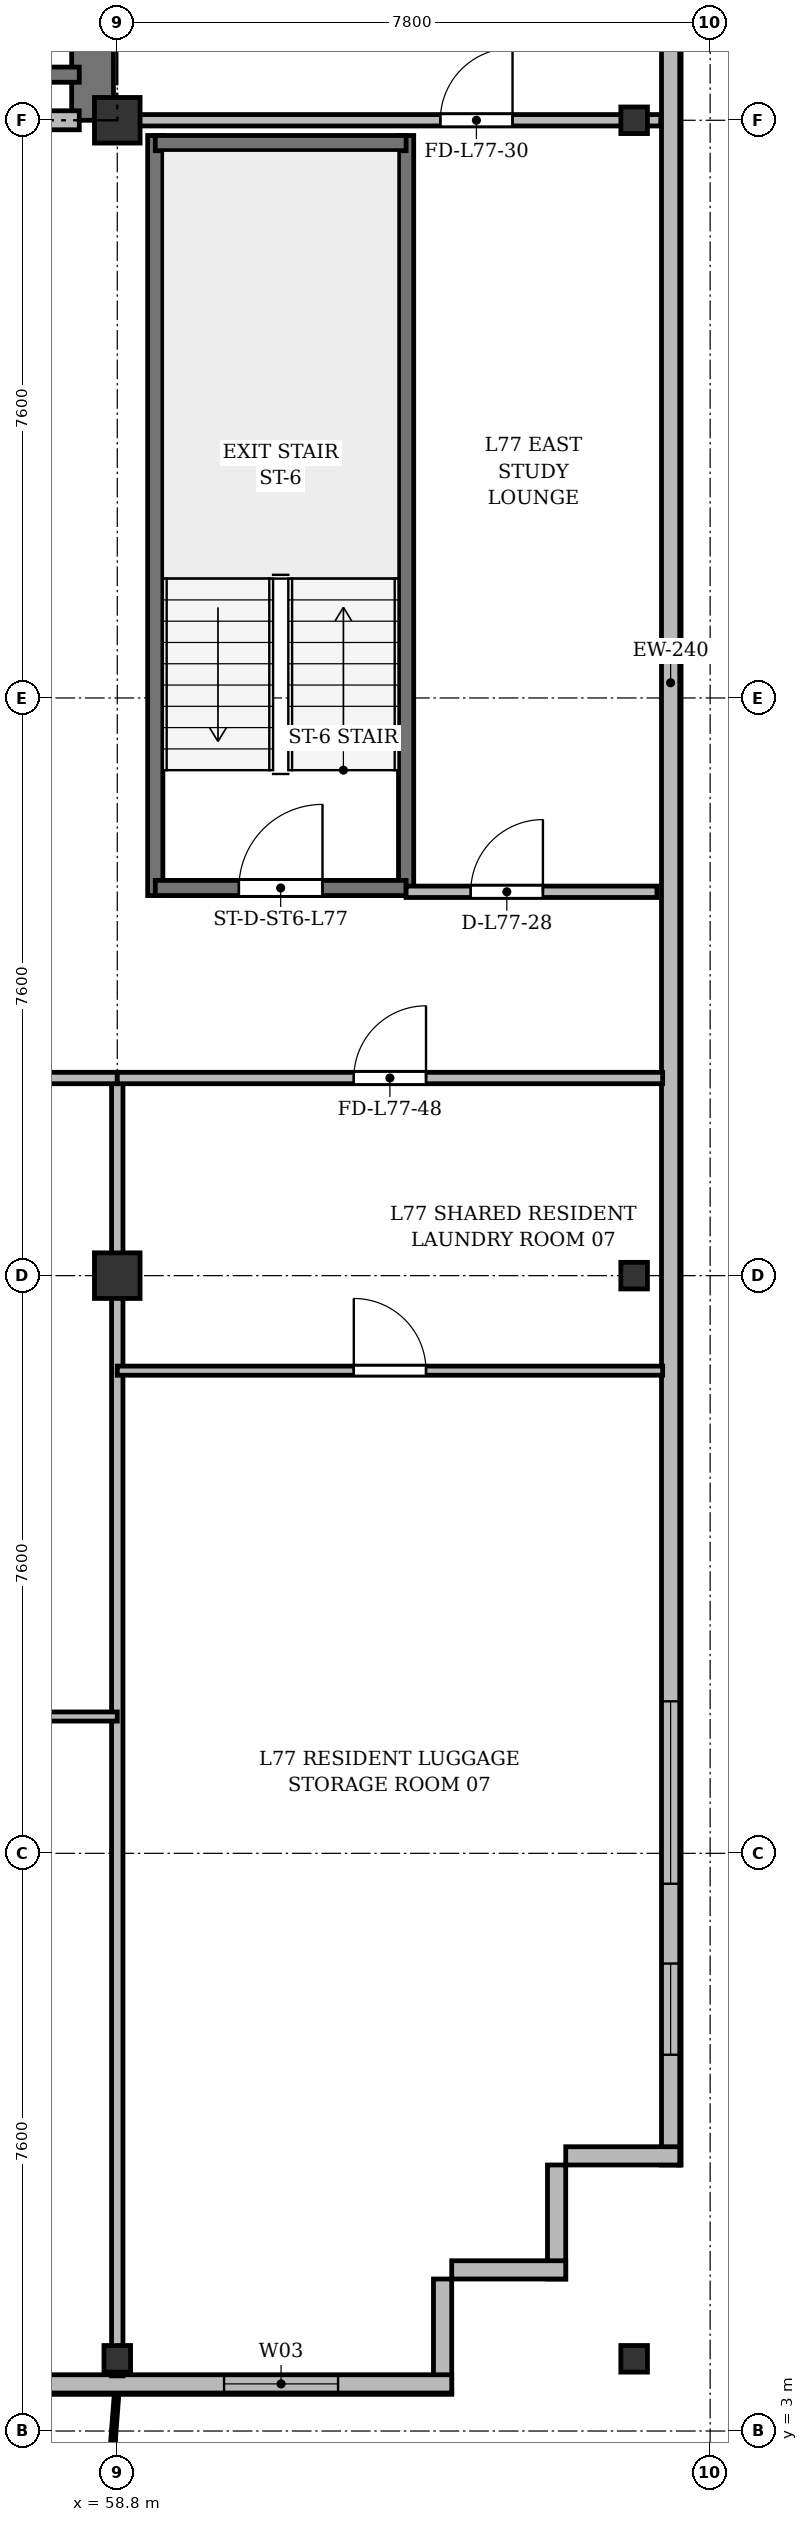
"""IFC4 building model, lengths in metres.
Left out: names, types, materials, properties, quantities, classifications, styles, units other than length and angle.
Written with IfcOpenShell. Run it as: python <this file> out.ifc"""

import sys

from ifc_helpers import new_model, si_unit, direction, frame, frame_2d, origin, origin_2d, place, context, subcontext, project, spatial, rectangle, i_section, extrude, source, transform, mapped, element, fill, save


model = new_model("IFC4")
c1 = context("Model", 3, precision=1e-05, world=origin(), true_north=direction((0.0, 1.0)))
c2 = subcontext(c1, "Body", "Model", "MODEL_VIEW")
j1 = project(units=[si_unit("LENGTHUNIT", "METRE"), si_unit("PLANEANGLEUNIT", "RADIAN")], contexts=[c1])
p1 = place(None, origin())
s1 = spatial("IfcSite", under=j1, at=p1, CompositionType="ELEMENT")
p2 = place(p1, origin())
s2 = spatial("IfcBuilding", under=s1, at=p2, CompositionType="ELEMENT")
p3 = place(p2, frame((0.0, 0.0, 295.5)))
s3 = spatial("IfcBuildingStorey", under=s2, at=p3, CompositionType="ELEMENT", Elevation=295.5)
m1 = source(origin(), c2, "Body", "SweptSolid", [
    extrude(i_section(OverallWidth=0.35, OverallDepth=0.35, WebThickness=0.018, FlangeThickness=0.028, at=origin_2d()), origin(), (0.0, 0.0, 1.0), 3.6),
])
p4 = place(p3, frame((58.8, 3.95, 0.0), z_axis=(0.0, 0.0, 1.0), x_axis=(1.0, 0.0, 0.0)))
e1 = element("IfcColumn", 1, at=p4, inside=s3, PredefinedType="COLUMN", context=c2, shape_type="MappedRepresentation", body=[
    mapped(m1, transform((0.0, 0.0, 0.0), x_axis=(1.0, 0.0, 0.0), y_axis=(0.0, 1.0, 0.0), z_axis=(0.0, 0.0, 1.0), scale=1.0)),
])
m2 = source(origin(), c2, "Body", "SweptSolid", [
    extrude(rectangle(XDim=0.6, YDim=0.6, at=origin_2d()), origin(), (0.0, 0.0, 1.0), 3.6),
])
for number, where, z_axis, x_axis in (
    (2, (58.8, 18.2, 0.0), (0.0, 0.0, 1.0), (1.0, 0.0, 0.0)),
    (3, (58.8, 33.4, 0.0), (0.0, 0.0, 1.0), (1.0, 0.0, 0.0)),
):
    element("IfcColumn", number, at=place(p3, frame(where, z_axis=z_axis, x_axis=x_axis)), inside=s3, PredefinedType="COLUMN", context=c2, shape_type="MappedRepresentation", body=[
        mapped(m2, transform((0.0, 0.0, 0.0), x_axis=(1.0, 0.0, 0.0), y_axis=(0.0, 1.0, 0.0), z_axis=(0.0, 0.0, 1.0), scale=1.0)),
    ])
for number, where, z_axis, x_axis in (
    (4, (65.6, 3.95, 0.0), (0.0, 0.0, 1.0), (1.0, 0.0, 0.0)),
    (5, (65.6, 18.2, 0.0), (0.0, 0.0, 1.0), (1.0, 0.0, 0.0)),
    (6, (65.6, 33.4, 0.0), (0.0, 0.0, 1.0), (1.0, 0.0, 0.0)),
):
    element("IfcColumn", number, at=place(p3, frame(where, z_axis=z_axis, x_axis=x_axis)), inside=s3, PredefinedType="COLUMN", context=c2, shape_type="MappedRepresentation", body=[
        mapped(m1, transform((0.0, 0.0, 0.0), x_axis=(1.0, 0.0, 0.0), y_axis=(0.0, 1.0, 0.0), z_axis=(0.0, 0.0, 1.0), scale=1.0)),
    ])
p5 = place(p3, frame((66.08, 45.5, 0.0), z_axis=(0.0, 0.0, 1.0), x_axis=(0.0, -1.0, 0.0)))
e7 = element("IfcWall", 7, at=p5, inside=s3, PredefinedType="SOLIDWALL", context=c2, shape_type="SweptSolid", body=[
    extrude(rectangle(XDim=39.0, YDim=0.24, at=frame_2d((19.5, 0.0))), origin(), (0.0, 0.0, 1.0), 3.26),
])
p6 = place(p5, frame((36.35, 0.0, 0.92)))
e8 = element("IfcOpeningElement", 8, at=p6, cuts=e7, PredefinedType="OPENING", context=c2, shape_type="SweptSolid", body=[
    extrude(rectangle(XDim=1.2, YDim=1.65, at=frame_2d((0.6, 0.825))), frame((0.0, 0.13, 0.0), z_axis=(0.0, -1.0, 0.0), x_axis=(1.0, 0.0, 0.0)), (0.0, 0.0, 1.0), 0.26),
])
p7 = place(p5, frame((32.9, 0.0, 0.92)))
e9 = element("IfcOpeningElement", 9, at=p7, cuts=e7, PredefinedType="OPENING", context=c2, shape_type="SweptSolid", body=[
    extrude(rectangle(XDim=2.4, YDim=2.1, at=frame_2d((1.2, 1.05))), frame((0.0, 0.13, 0.0), z_axis=(0.0, -1.0, 0.0), x_axis=(1.0, 0.0, 0.0)), (0.0, 0.0, 1.0), 0.26),
])
p8 = place(p5, frame((7.5, 0.0, 0.92)))
e10 = element("IfcOpeningElement", 10, at=p8, cuts=e7, PredefinedType="OPENING", context=c2, shape_type="SweptSolid", body=[
    extrude(rectangle(XDim=2.4, YDim=2.1, at=frame_2d((1.2, 1.05))), frame((0.0, 0.13, 0.0), z_axis=(0.0, -1.0, 0.0), x_axis=(1.0, 0.0, 0.0)), (0.0, 0.0, 1.0), 0.26),
])
p9 = place(p5, frame((4.5, 0.0, 0.92)))
e11 = element("IfcOpeningElement", 11, at=p9, cuts=e7, PredefinedType="OPENING", context=c2, shape_type="SweptSolid", body=[
    extrude(rectangle(XDim=1.2, YDim=1.65, at=frame_2d((0.6, 0.825))), frame((0.0, 0.13, 0.0), z_axis=(0.0, -1.0, 0.0), x_axis=(1.0, 0.0, 0.0)), (0.0, 0.0, 1.0), 0.26),
])
p10 = place(p5, frame((1.15, 0.0, 0.92)))
e12 = element("IfcOpeningElement", 12, at=p10, cuts=e7, PredefinedType="OPENING", context=c2, shape_type="SweptSolid", body=[
    extrude(rectangle(XDim=1.2, YDim=1.65, at=frame_2d((0.6, 0.825))), frame((0.0, 0.13, 0.0), z_axis=(0.0, -1.0, 0.0), x_axis=(1.0, 0.0, 0.0)), (0.0, 0.0, 1.0), 0.26),
])
p11 = place(p3, frame((66.2, 6.62, 0.0), z_axis=(0.0, 0.0, 1.0), x_axis=(-1.0, 0.0, 0.0)))
e13 = element("IfcWall", 13, at=p11, inside=s3, PredefinedType="SOLIDWALL", context=c2, shape_type="SweptSolid", body=[
    extrude(rectangle(XDim=1.5, YDim=0.24, at=frame_2d((0.75, 0.0))), origin(), (0.0, 0.0, 1.0), 2.76),
])
for number, where, z_axis, x_axis in (
    (14, (64.58, 6.5, 0.0), (0.0, 0.0, 1.0), (0.0, -1.0, 0.0)),
    (15, (64.7, 5.12, 0.0), (0.0, 0.0, 1.0), (-1.0, 0.0, 0.0)),
):
    element("IfcWall", number, at=place(p3, frame(where, z_axis=z_axis, x_axis=x_axis)), inside=s3, PredefinedType="SOLIDWALL", context=c2, shape_type="SweptSolid", body=[
        extrude(rectangle(XDim=1.5, YDim=0.24, at=frame_2d((0.75, 0.0))), origin(), (0.0, 0.0, 1.0), 3.26),
    ])
p12 = place(p3, frame((63.08, 5.0, 0.0), z_axis=(0.0, 0.0, 1.0), x_axis=(0.0, -1.0, 0.0)))
e16 = element("IfcWall", 16, at=p12, inside=s3, PredefinedType="SOLIDWALL", context=c2, shape_type="SweptSolid", body=[
    extrude(rectangle(XDim=1.5, YDim=0.24, at=frame_2d((0.75, 0.0))), origin(), (0.0, 0.0, 1.0), 2.81),
])
p13 = place(p3, frame((63.2, 3.62, 0.0), z_axis=(0.0, 0.0, 1.0), x_axis=(-1.0, 0.0, 0.0)))
e17 = element("IfcWall", 17, at=p13, inside=s3, PredefinedType="SOLIDWALL", context=c2, shape_type="SweptSolid", body=[
    extrude(rectangle(XDim=20.2, YDim=0.24, at=frame_2d((10.1, 0.0))), origin(), (0.0, 0.0, 1.0), 3.26),
])
p14 = place(p13, frame((1.495, 0.0, 0.9)))
e18 = element("IfcOpeningElement", 18, at=p14, cuts=e17, PredefinedType="OPENING", context=c2, shape_type="SweptSolid", body=[
    extrude(rectangle(XDim=1.5, YDim=1.75, at=frame_2d((0.75, 0.875))), frame((0.0, 0.13, 0.0), z_axis=(0.0, -1.0, 0.0), x_axis=(1.0, 0.0, 0.0)), (0.0, 0.0, 1.0), 0.26),
])
p15 = place(p13, frame((7.3, 0.0, 0.9)))
e19 = element("IfcOpeningElement", 19, at=p15, cuts=e17, PredefinedType="OPENING", context=c2, shape_type="SweptSolid", body=[
    extrude(rectangle(XDim=2.0, YDim=1.95, at=frame_2d((1.0, 0.975))), frame((0.0, 0.13, 0.0), z_axis=(0.0, -1.0, 0.0), x_axis=(1.0, 0.0, 0.0)), (0.0, 0.0, 1.0), 0.26),
])
p16 = place(p13, frame((13.864, 0.0, 0.0)))
e20 = element("IfcOpeningElement", 20, at=p16, cuts=e17, PredefinedType="OPENING", context=c2, shape_type="SweptSolid", body=[
    extrude(rectangle(XDim=1.2, YDim=2.2, at=frame_2d((0.6, 1.1))), frame((0.0, 0.13, 0.0), z_axis=(0.0, -1.0, 0.0), x_axis=(1.0, 0.0, 0.0)), (0.0, 0.0, 1.0), 0.26),
])
p17 = place(p13, frame((16.7, 0.0, 0.9)))
e21 = element("IfcOpeningElement", 21, at=p17, cuts=e17, PredefinedType="OPENING", context=c2, shape_type="SweptSolid", body=[
    extrude(rectangle(XDim=1.8, YDim=1.8, at=frame_2d((0.9, 0.9))), frame((0.0, 0.13, 0.0), z_axis=(0.0, -1.0, 0.0), x_axis=(1.0, 0.0, 0.0)), (0.0, 0.0, 1.0), 0.26),
])
p18 = place(p3, frame((58.475, 33.4, 0.0), z_axis=(0.0, 0.0, 1.0), x_axis=(0.0, 1.0, 0.0)))
e22 = element("IfcWall", 22, at=p18, inside=s3, PredefinedType="SHEAR", context=c2, shape_type="SweptSolid", body=[
    extrude(rectangle(XDim=11.55, YDim=0.55, at=frame_2d((5.775, 0.0))), origin(), (0.0, 0.0, 1.0), 3.26),
])
p19 = place(p3, frame((54.9, 34.0, 0.0), z_axis=(0.0, 0.0, 1.0), x_axis=(1.0, 0.0, 0.0)))
e23 = element("IfcWall", 23, at=p19, inside=s3, PredefinedType="SHEAR", context=c2, shape_type="SweptSolid", body=[
    extrude(rectangle(XDim=3.4, YDim=0.2, at=frame_2d((1.7, 0.0))), origin(), (0.0, 0.0, 1.0), 3.26),
])
for number, where, z_axis, x_axis in (
    (24, (59.3, 23.2, 0.0), (0.0, 0.0, 1.0), (0.0, 1.0, 0.0)),
    (25, (62.6, 23.2, 0.0), (0.0, 0.0, 1.0), (0.0, 1.0, 0.0)),
):
    element("IfcWall", number, at=place(p3, frame(where, z_axis=z_axis, x_axis=x_axis)), inside=s3, PredefinedType="SHEAR", context=c2, shape_type="SweptSolid", body=[
        extrude(rectangle(XDim=10.0, YDim=0.2, at=frame_2d((5.0, 0.0))), origin(), (0.0, 0.0, 1.0), 3.26),
    ])
p20 = place(p3, frame((59.3, 33.1, 0.0), z_axis=(0.0, 0.0, 1.0), x_axis=(1.0, 0.0, 0.0)))
e26 = element("IfcWall", 26, at=p20, inside=s3, PredefinedType="SHEAR", context=c2, shape_type="SweptSolid", body=[
    extrude(rectangle(XDim=3.3, YDim=0.2, at=frame_2d((1.65, 0.0))), origin(), (0.0, 0.0, 1.0), 3.26),
])
p21 = place(p3, frame((59.3, 23.3, 0.0), z_axis=(0.0, 0.0, 1.0), x_axis=(1.0, 0.0, 0.0)))
e27 = element("IfcWall", 27, at=p21, inside=s3, PredefinedType="SHEAR", context=c2, shape_type="SweptSolid", body=[
    extrude(rectangle(XDim=3.3, YDim=0.2, at=frame_2d((1.65, 0.0))), origin(), (0.0, 0.0, 1.0), 3.26),
])
p22 = place(p21, frame((1.1, 0.0, 0.0)))
e28 = element("IfcOpeningElement", 28, at=p22, cuts=e27, PredefinedType="OPENING", context=c2, shape_type="SweptSolid", body=[
    extrude(rectangle(XDim=1.1, YDim=2.15, at=frame_2d((0.55, 1.075))), frame((0.0, 0.11, 0.0), z_axis=(0.0, -1.0, 0.0), x_axis=(1.0, 0.0, 0.0)), (0.0, 0.0, 1.0), 0.22),
])
p23 = place(p3, frame((47.15, 33.4, 0.0), z_axis=(0.0, 0.0, 1.0), x_axis=(1.0, 0.0, 0.0)))
e29 = element("IfcWall", 29, at=p23, inside=s3, PredefinedType="PARTITIONING", context=c2, shape_type="SweptSolid", body=[
    extrude(rectangle(XDim=11.15, YDim=0.25, at=frame_2d((5.575, 0.0))), origin(), (0.0, 0.0, 1.0), 2.81),
])
p24 = place(p23, frame((0.7, 0.0, 0.0)))
e30 = element("IfcOpeningElement", 30, at=p24, cuts=e29, PredefinedType="OPENING", context=c2, shape_type="SweptSolid", body=[
    extrude(rectangle(XDim=0.95, YDim=2.15, at=frame_2d((0.475, 1.075))), frame((0.0, 0.135, 0.0), z_axis=(0.0, -1.0, 0.0), x_axis=(1.0, 0.0, 0.0)), (0.0, 0.0, 1.0), 0.27),
])
p25 = place(p23, frame((6.0, 0.0, 0.0)))
e31 = element("IfcOpeningElement", 31, at=p25, cuts=e29, PredefinedType="OPENING", context=c2, shape_type="SweptSolid", body=[
    extrude(rectangle(XDim=1.2, YDim=2.15, at=frame_2d((0.6, 1.075))), frame((0.0, 0.135, 0.0), z_axis=(0.0, -1.0, 0.0), x_axis=(1.0, 0.0, 0.0)), (0.0, 0.0, 1.0), 0.27),
])
p26 = place(p3, frame((62.6, 23.25, 0.0), z_axis=(0.0, 0.0, 1.0), x_axis=(1.0, 0.0, 0.0)))
e32 = element("IfcWall", 32, at=p26, inside=s3, PredefinedType="PARTITIONING", context=c2, shape_type="SweptSolid", body=[
    extrude(rectangle(XDim=3.3, YDim=0.15, at=frame_2d((1.65, 0.0))), origin(), (0.0, 0.0, 1.0), 2.76),
])
p27 = place(p26, frame((0.85, 0.0, 0.0)))
e33 = element("IfcOpeningElement", 33, at=p27, cuts=e32, PredefinedType="OPENING", context=c2, shape_type="SweptSolid", body=[
    extrude(rectangle(XDim=0.95, YDim=2.15, at=frame_2d((0.475, 1.075))), frame((0.0, 0.085, 0.0), z_axis=(0.0, -1.0, 0.0), x_axis=(1.0, 0.0, 0.0)), (0.0, 0.0, 1.0), 0.17),
])
p28 = place(p3, frame((58.8, 33.4, 0.0), z_axis=(0.0, 0.0, 1.0), x_axis=(1.0, 0.0, 0.0)))
e34 = element("IfcWall", 34, at=p28, inside=s3, PredefinedType="PARTITIONING", context=c2, shape_type="SweptSolid", body=[
    extrude(rectangle(XDim=7.15, YDim=0.15, at=frame_2d((3.575, 0.0))), origin(), (0.0, 0.0, 1.0), 2.81),
])
p29 = place(p28, frame((4.25, 0.0, 0.0)))
e35 = element("IfcOpeningElement", 35, at=p29, cuts=e34, PredefinedType="OPENING", context=c2, shape_type="SweptSolid", body=[
    extrude(rectangle(XDim=0.95, YDim=2.15, at=frame_2d((0.475, 1.075))), frame((0.0, 0.085, 0.0), z_axis=(0.0, -1.0, 0.0), x_axis=(1.0, 0.0, 0.0)), (0.0, 0.0, 1.0), 0.17),
])
p30 = place(p3, frame((58.8, 3.725, 0.0), z_axis=(0.0, 0.0, 1.0), x_axis=(0.0, 1.0, 0.0)))
e36 = element("IfcWall", 36, at=p30, inside=s3, PredefinedType="PARTITIONING", context=c2, shape_type="SweptSolid", body=[
    extrude(rectangle(XDim=17.075, YDim=0.15, at=frame_2d((8.538, 0.0))), origin(), (0.0, 0.0, 1.0), 2.76),
])
p31 = place(p3, frame((51.0, 20.8, 0.0), z_axis=(0.0, 0.0, 1.0), x_axis=(1.0, 0.0, 0.0)))
e37 = element("IfcWall", 37, at=p31, inside=s3, PredefinedType="PARTITIONING", context=c2, shape_type="SweptSolid", body=[
    extrude(rectangle(XDim=7.8, YDim=0.15, at=frame_2d((3.9, 0.0))), origin(), (0.0, 0.0, 1.0), 2.76),
])
p32 = place(p31, frame((3.333, 0.0, 0.0)))
e38 = element("IfcOpeningElement", 38, at=p32, cuts=e37, PredefinedType="OPENING", context=c2, shape_type="SweptSolid", body=[
    extrude(rectangle(XDim=0.95, YDim=2.15, at=frame_2d((0.475, 1.075))), frame((0.0, 0.085, 0.0), z_axis=(0.0, -1.0, 0.0), x_axis=(1.0, 0.0, 0.0)), (0.0, 0.0, 1.0), 0.17),
])
p33 = place(p3, frame((51.0, 12.4, 0.0), z_axis=(0.0, 0.0, 1.0), x_axis=(1.0, 0.0, 0.0)))
e39 = element("IfcWall", 39, at=p33, inside=s3, PredefinedType="PARTITIONING", context=c2, shape_type="SweptSolid", body=[
    extrude(rectangle(XDim=7.8, YDim=0.12, at=frame_2d((3.9, 0.0))), origin(), (0.0, 0.0, 1.0), 2.76),
])
p34 = place(p33, frame((3.333, 0.0, 0.0)))
e40 = element("IfcOpeningElement", 40, at=p34, cuts=e39, PredefinedType="OPENING", context=c2, shape_type="SweptSolid", body=[
    extrude(rectangle(XDim=0.95, YDim=2.15, at=frame_2d((0.475, 1.075))), frame((0.0, 0.07, 0.0), z_axis=(0.0, -1.0, 0.0), x_axis=(1.0, 0.0, 0.0)), (0.0, 0.0, 1.0), 0.14),
])
p35 = place(p3, frame((58.8, 20.8, 0.0), z_axis=(0.0, 0.0, 1.0), x_axis=(1.0, 0.0, 0.0)))
e41 = element("IfcWall", 41, at=p35, inside=s3, PredefinedType="PARTITIONING", context=c2, shape_type="SweptSolid", body=[
    extrude(rectangle(XDim=7.175, YDim=0.15, at=frame_2d((3.587, 0.0))), origin(), (0.0, 0.0, 1.0), 2.76),
])
p36 = place(p35, frame((3.112, 0.0, 0.0)))
e42 = element("IfcOpeningElement", 42, at=p36, cuts=e41, PredefinedType="OPENING", context=c2, shape_type="SweptSolid", body=[
    extrude(rectangle(XDim=0.95, YDim=2.15, at=frame_2d((0.475, 1.075))), frame((0.0, 0.085, 0.0), z_axis=(0.0, -1.0, 0.0), x_axis=(1.0, 0.0, 0.0)), (0.0, 0.0, 1.0), 0.17),
])
p37 = place(p3, frame((58.8, 16.95, 0.0), z_axis=(0.0, 0.0, 1.0), x_axis=(1.0, 0.0, 0.0)))
e43 = element("IfcWall", 43, at=p37, inside=s3, PredefinedType="PARTITIONING", context=c2, shape_type="SweptSolid", body=[
    extrude(rectangle(XDim=7.175, YDim=0.12, at=frame_2d((3.587, 0.0))), origin(), (0.0, 0.0, 1.0), 2.76),
])
p38 = place(p37, frame((3.112, 0.0, 0.0)))
e44 = element("IfcOpeningElement", 44, at=p38, cuts=e43, PredefinedType="OPENING", context=c2, shape_type="SweptSolid", body=[
    extrude(rectangle(XDim=0.95, YDim=2.15, at=frame_2d((0.475, 1.075))), frame((0.0, 0.07, 0.0), z_axis=(0.0, -1.0, 0.0), x_axis=(1.0, 0.0, 0.0)), (0.0, 0.0, 1.0), 0.14),
])
m3 = source(origin(), c2, "Body", "SweptSolid", [
    extrude(rectangle(XDim=1.2, YDim=1.65, at=frame_2d((0.6, 0.825))), frame((0.0, 0.03, 0.0), z_axis=(0.0, -1.0, 0.0), x_axis=(1.0, 0.0, 0.0)), (0.0, 0.0, 1.0), 0.06),
])
p39 = place(p6, origin())
e45 = element("IfcWindow", 45, at=p39, inside=s3, PartitioningType="SINGLE_PANEL", PredefinedType="WINDOW", context=c2, shape_type="MappedRepresentation", body=[
    mapped(m3, transform((0.0, 0.0, 0.0), x_axis=(1.0, 0.0, 0.0), y_axis=(0.0, 1.0, 0.0), z_axis=(0.0, 0.0, 1.0), scale=1.0)),
])
fill(e8, e45)
m4 = source(origin(), c2, "Body", "SweptSolid", [
    extrude(rectangle(XDim=2.4, YDim=2.1, at=frame_2d((1.2, 1.05))), frame((0.0, 0.03, 0.0), z_axis=(0.0, -1.0, 0.0), x_axis=(1.0, 0.0, 0.0)), (0.0, 0.0, 1.0), 0.06),
])
p40 = place(p7, origin())
e46 = element("IfcWindow", 46, at=p40, inside=s3, PartitioningType="SINGLE_PANEL", PredefinedType="WINDOW", context=c2, shape_type="MappedRepresentation", body=[
    mapped(m4, transform((0.0, 0.0, 0.0), x_axis=(1.0, 0.0, 0.0), y_axis=(0.0, 1.0, 0.0), z_axis=(0.0, 0.0, 1.0), scale=1.0)),
])
fill(e9, e46)
m5 = source(origin(), c2, "Body", "SweptSolid", [
    extrude(rectangle(XDim=1.5, YDim=1.75, at=frame_2d((0.75, 0.875))), frame((0.0, 0.03, 0.0), z_axis=(0.0, -1.0, 0.0), x_axis=(1.0, 0.0, 0.0)), (0.0, 0.0, 1.0), 0.06),
])
p41 = place(p14, origin())
e47 = element("IfcWindow", 47, at=p41, inside=s3, PartitioningType="SINGLE_PANEL", PredefinedType="WINDOW", context=c2, shape_type="MappedRepresentation", body=[
    mapped(m5, transform((0.0, 0.0, 0.0), x_axis=(1.0, 0.0, 0.0), y_axis=(0.0, 1.0, 0.0), z_axis=(0.0, 0.0, 1.0), scale=1.0)),
])
fill(e18, e47)
m6 = source(origin(), c2, "Body", "SweptSolid", [
    extrude(rectangle(XDim=1.1, YDim=2.15, at=frame_2d((0.55, 1.075))), frame((0.0, 0.025, 0.0), z_axis=(0.0, -1.0, 0.0), x_axis=(1.0, 0.0, 0.0)), (0.0, 0.0, 1.0), 0.05),
])
p42 = place(p22, origin())
e48 = element("IfcDoor", 48, at=p42, inside=s3, OperationType="SINGLE_SWING_RIGHT", PredefinedType="DOOR", context=c2, shape_type="MappedRepresentation", body=[
    mapped(m6, transform((0.0, 0.0, 0.0), x_axis=(1.0, 0.0, 0.0), y_axis=(0.0, 1.0, 0.0), z_axis=(0.0, 0.0, 1.0), scale=1.0)),
])
fill(e28, e48)
m7 = source(origin(), c2, "Body", "SweptSolid", [
    extrude(rectangle(XDim=0.95, YDim=2.15, at=frame_2d((0.475, 1.075))), frame((0.0, 0.025, 0.0), z_axis=(0.0, -1.0, 0.0), x_axis=(1.0, 0.0, 0.0)), (0.0, 0.0, 1.0), 0.05),
])
p43 = place(p27, origin())
e49 = element("IfcDoor", 49, at=p43, inside=s3, OperationType="SINGLE_SWING_RIGHT", PredefinedType="DOOR", context=c2, shape_type="MappedRepresentation", body=[
    mapped(m7, transform((0.0, 0.0, 0.0), x_axis=(1.0, 0.0, 0.0), y_axis=(0.0, 1.0, 0.0), z_axis=(0.0, 0.0, 1.0), scale=1.0)),
])
fill(e33, e49)
p44 = place(p29, origin())
e50 = element("IfcDoor", 50, at=p44, inside=s3, OperationType="SINGLE_SWING_RIGHT", PredefinedType="DOOR", context=c2, shape_type="MappedRepresentation", body=[
    mapped(m7, transform((0.0, 0.0, 0.0), x_axis=(1.0, 0.0, 0.0), y_axis=(0.0, 1.0, 0.0), z_axis=(0.0, 0.0, 1.0), scale=1.0)),
])
fill(e35, e50)
p45 = place(p36, origin())
e51 = element("IfcDoor", 51, at=p45, inside=s3, OperationType="SINGLE_SWING_RIGHT", PredefinedType="DOOR", context=c2, shape_type="MappedRepresentation", body=[
    mapped(m7, transform((0.0, 0.0, 0.0), x_axis=(1.0, 0.0, 0.0), y_axis=(0.0, 1.0, 0.0), z_axis=(0.0, 0.0, 1.0), scale=1.0)),
])
fill(e42, e51)
p46 = place(p38, origin())
e52 = element("IfcDoor", 52, at=p46, inside=s3, OperationType="SINGLE_SWING_LEFT", PredefinedType="DOOR", context=c2, shape_type="MappedRepresentation", body=[
    mapped(m7, transform((0.0, 0.0, 0.0), x_axis=(1.0, 0.0, 0.0), y_axis=(0.0, 1.0, 0.0), z_axis=(0.0, 0.0, 1.0), scale=1.0)),
])
fill(e44, e52)
save(model, sys.argv[1])
